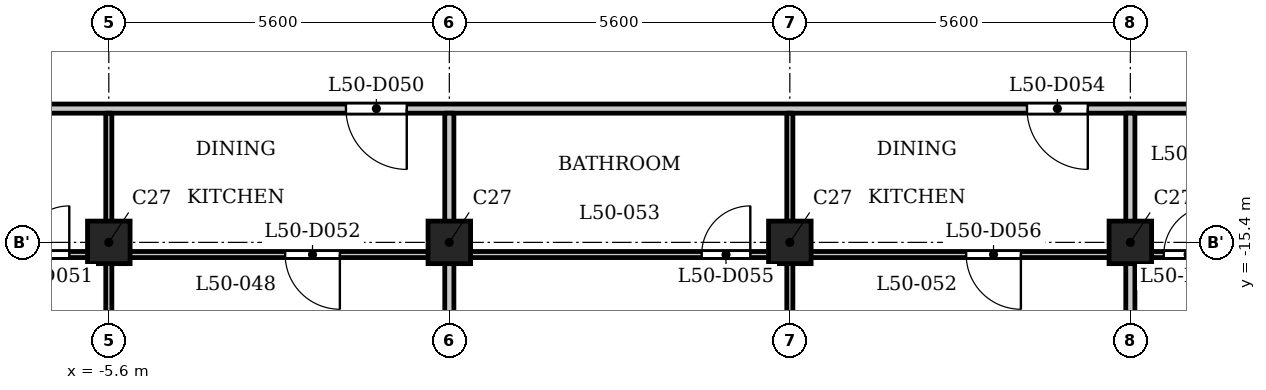
"""IFC4 building model, lengths in metres.
Left out: names, types, materials, properties, quantities, classifications, styles, units other than length and angle.
Written with IfcOpenShell. Run it as: python <this file> out.ifc"""

import sys

from ifc_helpers import new_model, si_unit, direction, frame, frame_2d, origin, origin_2d, place, context, subcontext, project, spatial, rectangle, extrude, element, fill, save


model = new_model("IFC4")
c1 = context("Model", 3, precision=1e-05, world=origin(), true_north=direction((0.0, 1.0)))
c2 = subcontext(c1, "Body", "Model", "MODEL_VIEW")
j1 = project(units=[si_unit("LENGTHUNIT", "METRE"), si_unit("PLANEANGLEUNIT", "RADIAN")], contexts=[c1])
p1 = place(None, origin())
s1 = spatial("IfcSite", under=j1, at=p1, CompositionType="ELEMENT")
p2 = place(p1, origin())
s2 = spatial("IfcBuilding", under=s1, at=p2, CompositionType="ELEMENT")
p3 = place(p2, frame((0.0, 0.0, 195.9)))
s3 = spatial("IfcBuildingStorey", under=s2, at=p3, CompositionType="ELEMENT", Elevation=195.9)
for number, where, z_axis, x_axis in (
    (1, (-5.6, -15.4, 0.0), (0.0, 0.0, 1.0), (1.0, 0.0, 0.0)),
    (2, (0.0, -15.4, 0.0), (0.0, 0.0, 1.0), (1.0, 0.0, 0.0)),
    (3, (5.6, -15.4, 0.0), (0.0, 0.0, 1.0), (1.0, 0.0, 0.0)),
    (4, (11.2, -15.4, 0.0), (0.0, 0.0, 1.0), (1.0, 0.0, 0.0)),
):
    element("IfcColumn", number, at=place(p3, frame(where, z_axis=z_axis, x_axis=x_axis)), inside=s3, PredefinedType="COLUMN", context=c2, shape_type="SweptSolid", body=[
        extrude(rectangle(XDim=0.7, YDim=0.7, at=origin_2d()), origin(), (0.0, 0.0, 1.0), 3.5),
    ])
p4 = place(p3, frame((-16.725, -15.6, 0.0), z_axis=(0.0, 0.0, 1.0), x_axis=(1.0, 0.0, 0.0)))
e5 = element("IfcWall", 5, at=p4, inside=s3, PredefinedType="PARTITIONING", context=c2, shape_type="SweptSolid", body=[
    extrude(rectangle(XDim=33.45, YDim=0.1, at=frame_2d((16.725, 0.0))), origin(), (0.0, 0.0, 1.0), 3.2),
])
p5 = place(p4, frame((4.075, 0.0, 0.0)))
e6 = element("IfcOpeningElement", 6, at=p5, cuts=e5, PredefinedType="OPENING", context=c2, shape_type="SweptSolid", body=[
    extrude(rectangle(XDim=0.8, YDim=2.1, at=frame_2d((0.4, 1.05))), frame((0.0, 0.06, 0.0), z_axis=(0.0, -1.0, 0.0), x_axis=(1.0, 0.0, 0.0)), (0.0, 0.0, 1.0), 0.12),
])
p6 = place(p4, frame((1.825, 0.0, 0.0)))
e7 = element("IfcOpeningElement", 7, at=p6, cuts=e5, PredefinedType="OPENING", context=c2, shape_type="SweptSolid", body=[
    extrude(rectangle(XDim=0.9, YDim=2.1, at=frame_2d((0.45, 1.05))), frame((0.0, 0.06, 0.0), z_axis=(0.0, -1.0, 0.0), x_axis=(1.0, 0.0, 0.0)), (0.0, 0.0, 1.0), 0.12),
])
p7 = place(p4, frame((9.675, 0.0, 0.0)))
e8 = element("IfcOpeningElement", 8, at=p7, cuts=e5, PredefinedType="OPENING", context=c2, shape_type="SweptSolid", body=[
    extrude(rectangle(XDim=0.8, YDim=2.1, at=frame_2d((0.4, 1.05))), frame((0.0, 0.06, 0.0), z_axis=(0.0, -1.0, 0.0), x_axis=(1.0, 0.0, 0.0)), (0.0, 0.0, 1.0), 0.12),
])
p8 = place(p4, frame((14.025, 0.0, 0.0)))
e9 = element("IfcOpeningElement", 9, at=p8, cuts=e5, PredefinedType="OPENING", context=c2, shape_type="SweptSolid", body=[
    extrude(rectangle(XDim=0.9, YDim=2.1, at=frame_2d((0.45, 1.05))), frame((0.0, 0.06, 0.0), z_axis=(0.0, -1.0, 0.0), x_axis=(1.0, 0.0, 0.0)), (0.0, 0.0, 1.0), 0.12),
])
p9 = place(p4, frame((20.875, 0.0, 0.0)))
e10 = element("IfcOpeningElement", 10, at=p9, cuts=e5, PredefinedType="OPENING", context=c2, shape_type="SweptSolid", body=[
    extrude(rectangle(XDim=0.8, YDim=2.1, at=frame_2d((0.4, 1.05))), frame((0.0, 0.06, 0.0), z_axis=(0.0, -1.0, 0.0), x_axis=(1.0, 0.0, 0.0)), (0.0, 0.0, 1.0), 0.12),
])
p10 = place(p4, frame((25.225, 0.0, 0.0)))
e11 = element("IfcOpeningElement", 11, at=p10, cuts=e5, PredefinedType="OPENING", context=c2, shape_type="SweptSolid", body=[
    extrude(rectangle(XDim=0.9, YDim=2.1, at=frame_2d((0.45, 1.05))), frame((0.0, 0.06, 0.0), z_axis=(0.0, -1.0, 0.0), x_axis=(1.0, 0.0, 0.0)), (0.0, 0.0, 1.0), 0.12),
])
p11 = place(p4, frame((28.475, 0.0, 0.0)))
e12 = element("IfcOpeningElement", 12, at=p11, cuts=e5, PredefinedType="OPENING", context=c2, shape_type="SweptSolid", body=[
    extrude(rectangle(XDim=0.8, YDim=2.1, at=frame_2d((0.4, 1.05))), frame((0.0, 0.06, 0.0), z_axis=(0.0, -1.0, 0.0), x_axis=(1.0, 0.0, 0.0)), (0.0, 0.0, 1.0), 0.12),
])
p12 = place(p4, frame((30.675, 0.0, 0.0)))
e13 = element("IfcOpeningElement", 13, at=p12, cuts=e5, PredefinedType="OPENING", context=c2, shape_type="SweptSolid", body=[
    extrude(rectangle(XDim=0.9, YDim=2.1, at=frame_2d((0.45, 1.05))), frame((0.0, 0.06, 0.0), z_axis=(0.0, -1.0, 0.0), x_axis=(1.0, 0.0, 0.0)), (0.0, 0.0, 1.0), 0.12),
])
p13 = place(p3, frame((-17.4, -13.2, 0.0), z_axis=(0.0, 0.0, 1.0), x_axis=(1.0, 0.0, 0.0)))
e14 = element("IfcWall", 14, at=p13, inside=s3, PredefinedType="PARTITIONING", context=c2, shape_type="SweptSolid", body=[
    extrude(rectangle(XDim=34.8, YDim=0.15, at=frame_2d((17.4, 0.0))), origin(), (0.0, 0.0, 1.0), 3.2),
])
p14 = place(p13, frame((0.15, 0.0, 0.0)))
e15 = element("IfcOpeningElement", 15, at=p14, cuts=e14, PredefinedType="OPENING", context=c2, shape_type="SweptSolid", body=[
    extrude(rectangle(XDim=1.0, YDim=2.1, at=frame_2d((0.5, 1.05))), frame((0.0, 0.085, 0.0), z_axis=(0.0, -1.0, 0.0), x_axis=(1.0, 0.0, 0.0)), (0.0, 0.0, 1.0), 0.17),
])
p15 = place(p13, frame((33.55, 0.0, 0.0)))
e16 = element("IfcOpeningElement", 16, at=p15, cuts=e14, PredefinedType="OPENING", context=c2, shape_type="SweptSolid", body=[
    extrude(rectangle(XDim=1.0, YDim=2.1, at=frame_2d((0.5, 1.05))), frame((0.0, 0.085, 0.0), z_axis=(0.0, -1.0, 0.0), x_axis=(1.0, 0.0, 0.0)), (0.0, 0.0, 1.0), 0.17),
])
p16 = place(p13, frame((15.7, 0.0, 0.0)))
e17 = element("IfcOpeningElement", 17, at=p16, cuts=e14, PredefinedType="OPENING", context=c2, shape_type="SweptSolid", body=[
    extrude(rectangle(XDim=1.0, YDim=2.1, at=frame_2d((0.5, 1.05))), frame((0.0, 0.085, 0.0), z_axis=(0.0, -1.0, 0.0), x_axis=(1.0, 0.0, 0.0)), (0.0, 0.0, 1.0), 0.17),
])
p17 = place(p13, frame((26.9, 0.0, 0.0)))
e18 = element("IfcOpeningElement", 18, at=p17, cuts=e14, PredefinedType="OPENING", context=c2, shape_type="SweptSolid", body=[
    extrude(rectangle(XDim=1.0, YDim=2.1, at=frame_2d((0.5, 1.05))), frame((0.0, 0.085, 0.0), z_axis=(0.0, -1.0, 0.0), x_axis=(1.0, 0.0, 0.0)), (0.0, 0.0, 1.0), 0.17),
])
p18 = place(p3, frame((-5.6, -22.08, 0.0), z_axis=(0.0, 0.0, 1.0), x_axis=(0.0, 1.0, 0.0)))
e19 = element("IfcWall", 19, at=p18, inside=s3, PredefinedType="PARTITIONING", context=c2, shape_type="SweptSolid", body=[
    extrude(rectangle(XDim=6.43, YDim=0.1, at=frame_2d((3.215, 0.0))), origin(), (0.0, 0.0, 1.0), 3.2),
])
p19 = place(p18, frame((4.18, 0.0, 0.0)))
e20 = element("IfcOpeningElement", 20, at=p19, cuts=e19, PredefinedType="OPENING", context=c2, shape_type="SweptSolid", body=[
    extrude(rectangle(XDim=0.9, YDim=2.1, at=frame_2d((0.45, 1.05))), frame((0.0, 0.06, 0.0), z_axis=(0.0, -1.0, 0.0), x_axis=(1.0, 0.0, 0.0)), (0.0, 0.0, 1.0), 0.12),
])
p20 = place(p3, frame((-5.6, -15.55, 0.0), z_axis=(0.0, 0.0, 1.0), x_axis=(0.0, 1.0, 0.0)))
e21 = element("IfcWall", 21, at=p20, inside=s3, PredefinedType="PARTITIONING", context=c2, shape_type="SweptSolid", body=[
    extrude(rectangle(XDim=2.275, YDim=0.1, at=frame_2d((1.138, 0.0))), origin(), (0.0, 0.0, 1.0), 3.2),
])
p21 = place(p3, frame((0.0, -22.08, 0.0), z_axis=(0.0, 0.0, 1.0), x_axis=(0.0, 1.0, 0.0)))
e22 = element("IfcWall", 22, at=p21, inside=s3, PredefinedType="PARTITIONING", context=c2, shape_type="SweptSolid", body=[
    extrude(rectangle(XDim=6.43, YDim=0.15, at=frame_2d((3.215, 0.0))), origin(), (0.0, 0.0, 1.0), 3.2),
])
p22 = place(p3, frame((0.0, -15.55, 0.0), z_axis=(0.0, 0.0, 1.0), x_axis=(0.0, 1.0, 0.0)))
e23 = element("IfcWall", 23, at=p22, inside=s3, PredefinedType="PARTITIONING", context=c2, shape_type="SweptSolid", body=[
    extrude(rectangle(XDim=2.275, YDim=0.15, at=frame_2d((1.138, 0.0))), origin(), (0.0, 0.0, 1.0), 3.2),
])
p23 = place(p3, frame((5.6, -22.08, 0.0), z_axis=(0.0, 0.0, 1.0), x_axis=(0.0, 1.0, 0.0)))
e24 = element("IfcWall", 24, at=p23, inside=s3, PredefinedType="PARTITIONING", context=c2, shape_type="SweptSolid", body=[
    extrude(rectangle(XDim=6.43, YDim=0.1, at=frame_2d((3.215, 0.0))), origin(), (0.0, 0.0, 1.0), 3.2),
])
p24 = place(p23, frame((4.18, 0.0, 0.0)))
e25 = element("IfcOpeningElement", 25, at=p24, cuts=e24, PredefinedType="OPENING", context=c2, shape_type="SweptSolid", body=[
    extrude(rectangle(XDim=0.9, YDim=2.1, at=frame_2d((0.45, 1.05))), frame((0.0, 0.06, 0.0), z_axis=(0.0, -1.0, 0.0), x_axis=(1.0, 0.0, 0.0)), (0.0, 0.0, 1.0), 0.12),
])
p25 = place(p3, frame((5.6, -15.55, 0.0), z_axis=(0.0, 0.0, 1.0), x_axis=(0.0, 1.0, 0.0)))
e26 = element("IfcWall", 26, at=p25, inside=s3, PredefinedType="PARTITIONING", context=c2, shape_type="SweptSolid", body=[
    extrude(rectangle(XDim=2.275, YDim=0.1, at=frame_2d((1.138, 0.0))), origin(), (0.0, 0.0, 1.0), 3.2),
])
p26 = place(p3, frame((11.2, -22.08, 0.0), z_axis=(0.0, 0.0, 1.0), x_axis=(0.0, 1.0, 0.0)))
e27 = element("IfcWall", 27, at=p26, inside=s3, PredefinedType="PARTITIONING", context=c2, shape_type="SweptSolid", body=[
    extrude(rectangle(XDim=6.43, YDim=0.15, at=frame_2d((3.215, 0.0))), origin(), (0.0, 0.0, 1.0), 3.2),
])
p27 = place(p3, frame((11.2, -15.55, 0.0), z_axis=(0.0, 0.0, 1.0), x_axis=(0.0, 1.0, 0.0)))
e28 = element("IfcWall", 28, at=p27, inside=s3, PredefinedType="PARTITIONING", context=c2, shape_type="SweptSolid", body=[
    extrude(rectangle(XDim=2.275, YDim=0.15, at=frame_2d((1.138, 0.0))), origin(), (0.0, 0.0, 1.0), 3.2),
])
p28 = place(p16, origin())
e29 = element("IfcDoor", 29, at=p28, inside=s3, OperationType="SINGLE_SWING_RIGHT", PredefinedType="DOOR", context=c2, shape_type="SweptSolid", body=[
    extrude(rectangle(XDim=1.0, YDim=2.1, at=frame_2d((0.5, 1.05))), frame((0.0, 0.025, 0.0), z_axis=(0.0, -1.0, 0.0), x_axis=(1.0, 0.0, 0.0)), (0.0, 0.0, 1.0), 0.05),
])
fill(e17, e29)
p29 = place(p7, origin())
e30 = element("IfcDoor", 30, at=p29, inside=s3, OperationType="SINGLE_SWING_LEFT", PredefinedType="DOOR", context=c2, shape_type="SweptSolid", body=[
    extrude(rectangle(XDim=0.8, YDim=2.1, at=frame_2d((0.4, 1.05))), frame((0.0, 0.025, 0.0), z_axis=(0.0, -1.0, 0.0), x_axis=(1.0, 0.0, 0.0)), (0.0, 0.0, 1.0), 0.05),
])
fill(e8, e30)
p30 = place(p8, origin())
e31 = element("IfcDoor", 31, at=p30, inside=s3, OperationType="SINGLE_SWING_RIGHT", PredefinedType="DOOR", context=c2, shape_type="SweptSolid", body=[
    extrude(rectangle(XDim=0.9, YDim=2.1, at=frame_2d((0.45, 1.05))), frame((0.0, 0.025, 0.0), z_axis=(0.0, -1.0, 0.0), x_axis=(1.0, 0.0, 0.0)), (0.0, 0.0, 1.0), 0.05),
])
fill(e9, e31)
p31 = place(p17, origin())
e32 = element("IfcDoor", 32, at=p31, inside=s3, OperationType="SINGLE_SWING_RIGHT", PredefinedType="DOOR", context=c2, shape_type="SweptSolid", body=[
    extrude(rectangle(XDim=1.0, YDim=2.1, at=frame_2d((0.5, 1.05))), frame((0.0, 0.025, 0.0), z_axis=(0.0, -1.0, 0.0), x_axis=(1.0, 0.0, 0.0)), (0.0, 0.0, 1.0), 0.05),
])
fill(e18, e32)
p32 = place(p9, origin())
e33 = element("IfcDoor", 33, at=p32, inside=s3, OperationType="SINGLE_SWING_LEFT", PredefinedType="DOOR", context=c2, shape_type="SweptSolid", body=[
    extrude(rectangle(XDim=0.8, YDim=2.1, at=frame_2d((0.4, 1.05))), frame((0.0, 0.025, 0.0), z_axis=(0.0, -1.0, 0.0), x_axis=(1.0, 0.0, 0.0)), (0.0, 0.0, 1.0), 0.05),
])
fill(e10, e33)
p33 = place(p10, origin())
e34 = element("IfcDoor", 34, at=p33, inside=s3, OperationType="SINGLE_SWING_RIGHT", PredefinedType="DOOR", context=c2, shape_type="SweptSolid", body=[
    extrude(rectangle(XDim=0.9, YDim=2.1, at=frame_2d((0.45, 1.05))), frame((0.0, 0.025, 0.0), z_axis=(0.0, -1.0, 0.0), x_axis=(1.0, 0.0, 0.0)), (0.0, 0.0, 1.0), 0.05),
])
fill(e11, e34)
p34 = place(p11, origin())
e35 = element("IfcDoor", 35, at=p34, inside=s3, OperationType="SINGLE_SWING_LEFT", PredefinedType="DOOR", context=c2, shape_type="SweptSolid", body=[
    extrude(rectangle(XDim=0.8, YDim=2.1, at=frame_2d((0.4, 1.05))), frame((0.0, 0.025, 0.0), z_axis=(0.0, -1.0, 0.0), x_axis=(1.0, 0.0, 0.0)), (0.0, 0.0, 1.0), 0.05),
])
fill(e12, e35)
save(model, sys.argv[1])
